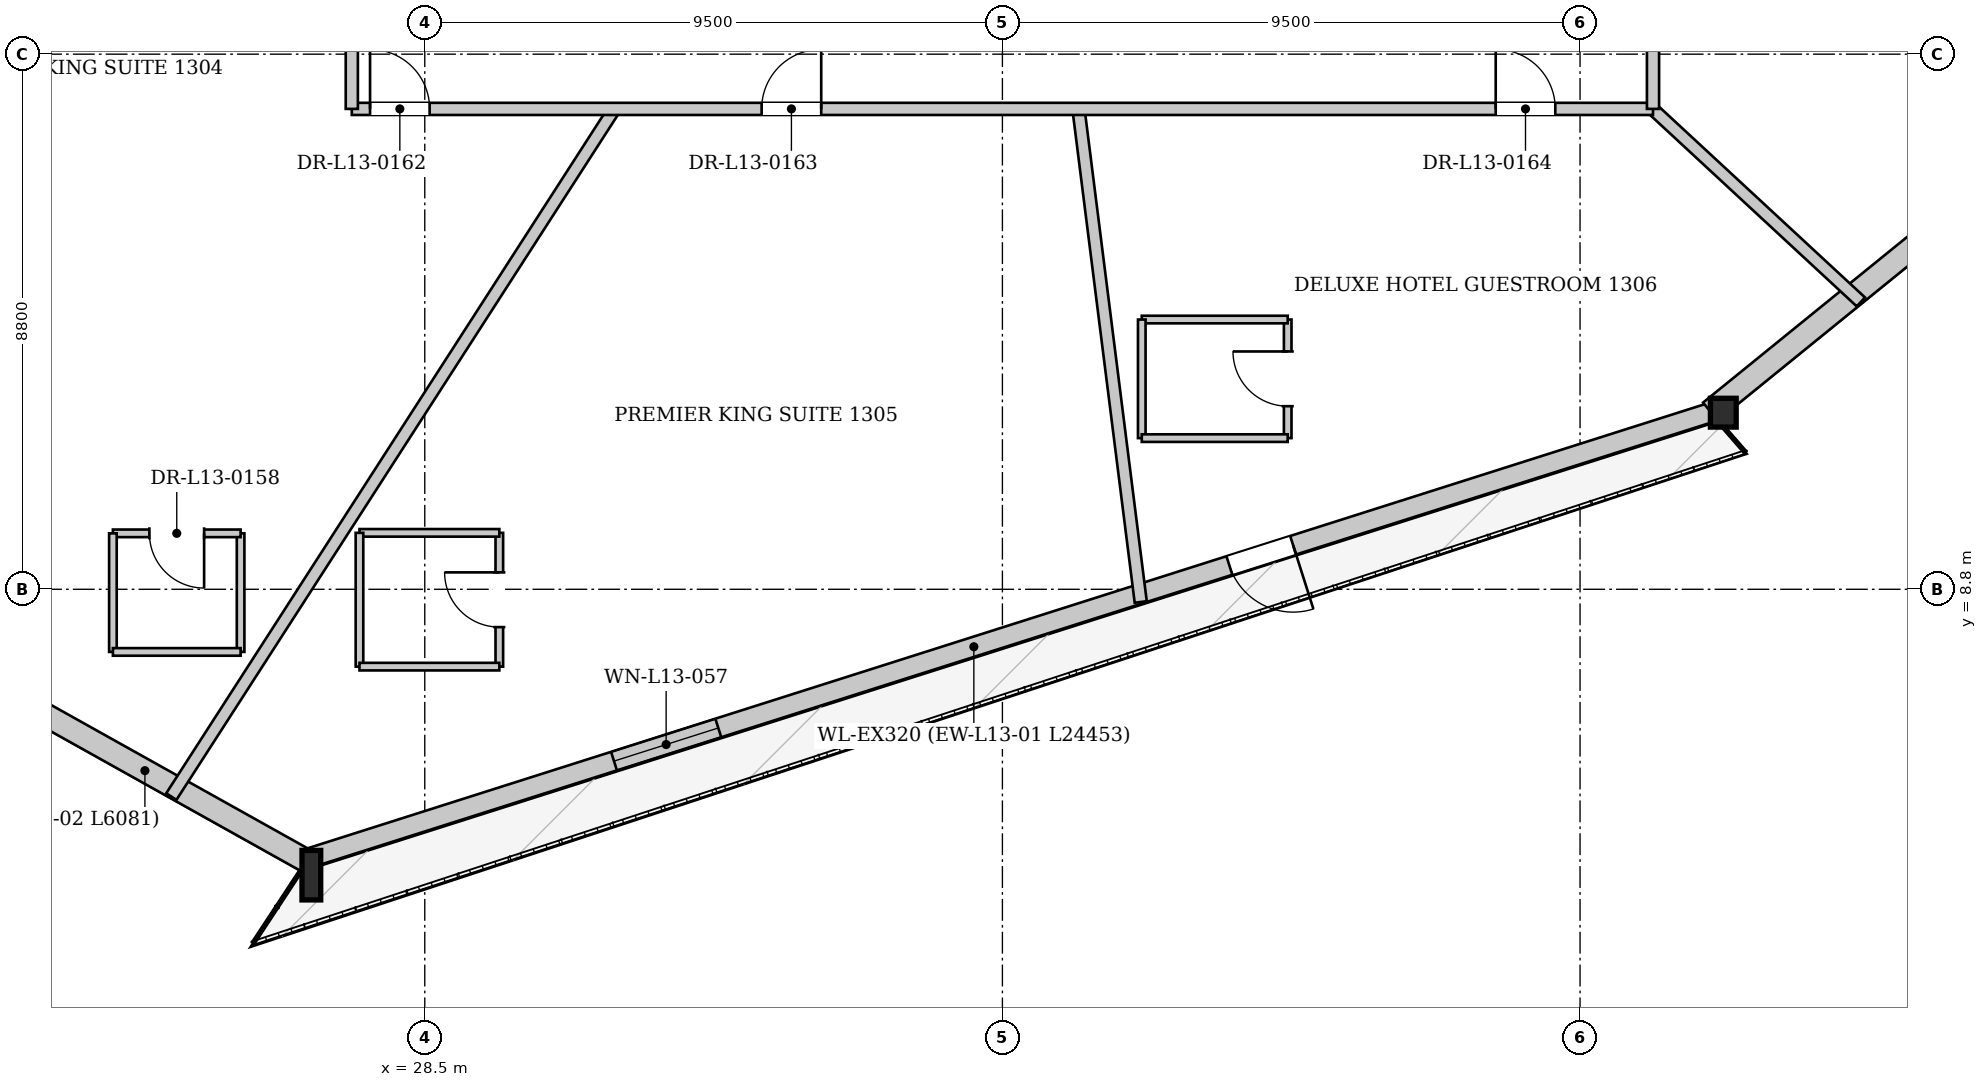
"""IFC4 building model, lengths in metres.
Left out: names, types, materials, properties, quantities, classifications, styles, units other than length and angle.
Written with IfcOpenShell. Run it as: python <this file> out.ifc"""

import sys

from ifc_helpers import new_model, si_unit, direction, frame, frame_2d, origin, origin_2d, place, context, subcontext, project, spatial, rectangle, i_section, extrude, source, transform, mapped, element, fill, save


model = new_model("IFC4")
c1 = context("Model", 3, precision=1e-05, world=origin(), true_north=direction((0.0, 1.0)))
c2 = subcontext(c1, "Body", "Model", "MODEL_VIEW")
j1 = project(units=[si_unit("LENGTHUNIT", "METRE"), si_unit("PLANEANGLEUNIT", "RADIAN")], contexts=[c1])
p1 = place(None, origin())
s1 = spatial("IfcSite", under=j1, at=p1, CompositionType="ELEMENT")
p2 = place(p1, origin())
s2 = spatial("IfcBuilding", under=s1, at=p2, CompositionType="ELEMENT")
p3 = place(p2, frame((0.0, 0.0, 54.15)))
s3 = spatial("IfcBuildingStorey", under=s2, at=p3, CompositionType="ELEMENT", Elevation=54.15)
m1 = source(origin(), c2, "Body", "SweptSolid", [
    extrude(i_section(OverallWidth=0.308, OverallDepth=0.814, WebThickness=0.021, FlangeThickness=0.04, at=origin_2d()), origin(), (0.0, 0.0, 1.0), 3.406),
])
p4 = place(p3, frame((26.459, 4.168, 0.0), z_axis=(0.103287038269, -0.040999435038, 0.993806235668), x_axis=(0.368942816589, 0.929452095639, 0.0)))
e1 = element("IfcColumn", 1, at=p4, inside=s3, PredefinedType="COLUMN", context=c2, shape_type="MappedRepresentation", body=[
    mapped(m1, transform((0.0, 0.0, 0.0), x_axis=(1.0, 0.0, 0.0), y_axis=(0.0, 1.0, 0.0), z_axis=(0.0, 0.0, 1.0), scale=1.0)),
])
m2 = source(origin(), c2, "Body", "SweptSolid", [
    extrude(i_section(OverallWidth=0.424, OverallDepth=0.474, WebThickness=0.043, FlangeThickness=0.068, at=origin_2d()), origin(), (0.0, 0.0, 1.0), 3.4),
])
p5 = place(p3, frame((49.763, 11.575, 0.0), z_axis=(0.054718314764, 0.075686487876, 0.995629178752), x_axis=(-0.810395288449, 0.585883500757, 0.0)))
e2 = element("IfcColumn", 2, at=p5, inside=s3, PredefinedType="COLUMN", context=c2, shape_type="MappedRepresentation", body=[
    mapped(m2, transform((0.0, 0.0, 0.0), x_axis=(1.0, 0.0, 0.0), y_axis=(0.0, 1.0, 0.0), z_axis=(0.0, 0.0, 1.0), scale=1.0)),
])
p6 = place(p3, frame((49.715, 11.728, 0.0), z_axis=(0.0, 0.0, 1.0), x_axis=(-0.95301817626, -0.30291311579, 0.0)))
e3 = element("IfcWall", 3, at=p6, inside=s3, PredefinedType="SOLIDWALL", context=c2, shape_type="SweptSolid", body=[
    extrude(rectangle(XDim=24.453, YDim=0.32, at=frame_2d((12.227, 0.0))), origin(), (0.0, 0.0, 1.0), 2.592),
])
p7 = place(p6, frame((7.275, 0.0, 0.0)))
e4 = element("IfcOpeningElement", 4, at=p7, cuts=e3, PredefinedType="OPENING", context=c2, shape_type="SweptSolid", body=[
    extrude(rectangle(XDim=1.1, YDim=2.3, at=frame_2d((0.55, 1.15))), frame((0.0, 0.17, 0.0), z_axis=(0.0, -1.0, 0.0), x_axis=(1.0, 0.0, 0.0)), (0.0, 0.0, 1.0), 0.34),
])
p8 = place(p6, frame((17.195, 0.0, 0.272)))
e5 = element("IfcOpeningElement", 5, at=p8, cuts=e3, PredefinedType="OPENING", context=c2, shape_type="SweptSolid", body=[
    extrude(rectangle(XDim=1.8, YDim=2.2, at=frame_2d((0.9, 1.1))), frame((0.0, 0.17, 0.0), z_axis=(0.0, -1.0, 0.0), x_axis=(1.0, 0.0, 0.0)), (0.0, 0.0, 1.0), 0.34),
])
p9 = place(p3, frame((26.552, 4.334, 0.0), z_axis=(0.0, 0.0, 1.0), x_axis=(-0.872917836557, 0.487867246923, 0.0)))
e6 = element("IfcWall", 6, at=p9, inside=s3, PredefinedType="SOLIDWALL", context=c2, shape_type="SweptSolid", body=[
    extrude(rectangle(XDim=6.081, YDim=0.38, at=frame_2d((3.041, 0.0))), origin(), (0.0, 0.0, 1.0), 2.592),
])
p10 = place(p3, frame((68.629, 27.134, 0.0), z_axis=(0.0, 0.0, 1.0), x_axis=(-0.7764202155, -0.630215557538, 0.0)))
e7 = element("IfcWall", 7, at=p10, inside=s3, PredefinedType="SOLIDWALL", context=c2, shape_type="SweptSolid", body=[
    extrude(rectangle(XDim=24.453, YDim=0.38, at=frame_2d((12.227, 0.0))), origin(), (0.0, 0.0, 1.0), 2.592),
])
p11 = place(p10, frame((4.147, 0.0, 0.222)))
e8 = element("IfcOpeningElement", 8, at=p11, cuts=e7, PredefinedType="OPENING", context=c2, shape_type="SweptSolid", body=[
    extrude(rectangle(XDim=2.2, YDim=2.25, at=frame_2d((1.1, 1.125))), frame((0.0, 0.2, 0.0), z_axis=(0.0, -1.0, 0.0), x_axis=(1.0, 0.0, 0.0)), (0.0, 0.0, 1.0), 0.4),
])
p12 = place(p10, frame((16.506, 0.0, 0.222)))
e9 = element("IfcOpeningElement", 9, at=p12, cuts=e7, PredefinedType="OPENING", context=c2, shape_type="SweptSolid", body=[
    extrude(rectangle(XDim=2.2, YDim=2.25, at=frame_2d((1.1, 1.125))), frame((0.0, 0.2, 0.0), z_axis=(0.0, -1.0, 0.0), x_axis=(1.0, 0.0, 0.0)), (0.0, 0.0, 1.0), 0.4),
])
p13 = place(p3, frame((31.62, 16.7, 0.0), z_axis=(0.0, 0.0, 1.0), x_axis=(-0.541710166358, -0.840565342888, 0.0)))
e10 = element("IfcWall", 10, at=p13, inside=s3, PredefinedType="PARTITIONING", context=c2, shape_type="SweptSolid", body=[
    extrude(rectangle(XDim=13.454, YDim=0.2, at=frame_2d((6.727, 0.0))), origin(), (0.0, 0.0, 1.0), 3.3),
])
p14 = place(p3, frame((39.251, 16.7, 0.0), z_axis=(0.0, 0.0, 1.0), x_axis=(0.125310369071, -0.992117589504, 0.0)))
e11 = element("IfcWall", 11, at=p14, inside=s3, PredefinedType="PARTITIONING", context=c2, shape_type="SweptSolid", body=[
    extrude(rectangle(XDim=8.173, YDim=0.2, at=frame_2d((4.086, 0.0))), origin(), (0.0, 0.0, 1.0), 3.3),
])
p15 = place(p3, frame((48.691, 16.7, 0.0), z_axis=(0.0, 0.0, 1.0), x_axis=(0.733736548666, -0.679434085951, 0.0)))
e12 = element("IfcWall", 12, at=p15, inside=s3, PredefinedType="PARTITIONING", context=c2, shape_type="SweptSolid", body=[
    extrude(rectangle(XDim=4.671, YDim=0.2, at=frame_2d((2.336, 0.0))), origin(), (0.0, 0.0, 1.0), 3.3),
])
p16 = place(p3, frame((25.471, 7.77, 0.0), z_axis=(0.0, 0.0, 1.0), x_axis=(0.0, 1.0, 0.0)))
e13 = element("IfcWall", 13, at=p16, inside=s3, PredefinedType="PARTITIONING", context=c2, shape_type="SweptSolid", body=[
    extrude(rectangle(XDim=1.95, YDim=0.125, at=frame_2d((0.975, 0.0))), origin(), (0.0, 0.0, 1.0), 3.3),
])
p17 = place(p3, frame((25.471, 9.72, 0.0), z_axis=(0.0, 0.0, 1.0), x_axis=(-1.0, 0.0, 0.0)))
e14 = element("IfcWall", 14, at=p17, inside=s3, PredefinedType="PARTITIONING", context=c2, shape_type="SweptSolid", body=[
    extrude(rectangle(XDim=2.1, YDim=0.125, at=frame_2d((1.05, 0.0))), origin(), (0.0, 0.0, 1.0), 3.3),
])
p18 = place(p17, frame((0.6, 0.0, 0.0)))
e15 = element("IfcOpeningElement", 15, at=p18, cuts=e14, PredefinedType="OPENING", context=c2, shape_type="SweptSolid", body=[
    extrude(rectangle(XDim=0.9, YDim=2.1, at=frame_2d((0.45, 1.05))), frame((0.0, 0.073, 0.0), z_axis=(0.0, -1.0, 0.0), x_axis=(1.0, 0.0, 0.0)), (0.0, 0.0, 1.0), 0.145),
])
p19 = place(p3, frame((23.371, 9.72, 0.0), z_axis=(0.0, 0.0, 1.0), x_axis=(0.0, -1.0, 0.0)))
e16 = element("IfcWall", 16, at=p19, inside=s3, PredefinedType="PARTITIONING", context=c2, shape_type="SweptSolid", body=[
    extrude(rectangle(XDim=1.95, YDim=0.125, at=frame_2d((0.975, 0.0))), origin(), (0.0, 0.0, 1.0), 3.3),
])
p20 = place(p3, frame((23.371, 7.77, 0.0), z_axis=(0.0, 0.0, 1.0), x_axis=(1.0, 0.0, 0.0)))
e17 = element("IfcWall", 17, at=p20, inside=s3, PredefinedType="PARTITIONING", context=c2, shape_type="SweptSolid", body=[
    extrude(rectangle(XDim=2.1, YDim=0.125, at=frame_2d((1.05, 0.0))), origin(), (0.0, 0.0, 1.0), 3.3),
])
p21 = place(p3, frame((29.726, 7.528, 0.0), z_axis=(0.0, 0.0, 1.0), x_axis=(0.0, 1.0, 0.0)))
e18 = element("IfcWall", 18, at=p21, inside=s3, PredefinedType="PARTITIONING", context=c2, shape_type="SweptSolid", body=[
    extrude(rectangle(XDim=2.2, YDim=0.125, at=frame_2d((1.1, 0.0))), origin(), (0.0, 0.0, 1.0), 2.795),
])
p22 = place(p21, frame((0.65, 0.0, 0.0)))
e19 = element("IfcOpeningElement", 19, at=p22, cuts=e18, PredefinedType="OPENING", context=c2, shape_type="SweptSolid", body=[
    extrude(rectangle(XDim=0.9, YDim=2.1, at=frame_2d((0.45, 1.05))), frame((0.0, 0.073, 0.0), z_axis=(0.0, -1.0, 0.0), x_axis=(1.0, 0.0, 0.0)), (0.0, 0.0, 1.0), 0.145),
])
p23 = place(p3, frame((29.726, 9.728, 0.0), z_axis=(0.0, 0.0, 1.0), x_axis=(-1.0, 0.0, 0.0)))
e20 = element("IfcWall", 20, at=p23, inside=s3, PredefinedType="PARTITIONING", context=c2, shape_type="SweptSolid", body=[
    extrude(rectangle(XDim=2.3, YDim=0.125, at=frame_2d((1.15, 0.0))), origin(), (0.0, 0.0, 1.0), 3.3),
])
p24 = place(p3, frame((27.426, 9.728, 0.0), z_axis=(0.0, 0.0, 1.0), x_axis=(0.0, -1.0, 0.0)))
e21 = element("IfcWall", 21, at=p24, inside=s3, PredefinedType="PARTITIONING", context=c2, shape_type="SweptSolid", body=[
    extrude(rectangle(XDim=2.2, YDim=0.125, at=frame_2d((1.1, 0.0))), origin(), (0.0, 0.0, 1.0), 3.3),
])
p25 = place(p3, frame((27.426, 7.528, 0.0), z_axis=(0.0, 0.0, 1.0), x_axis=(1.0, 0.0, 0.0)))
e22 = element("IfcWall", 22, at=p25, inside=s3, PredefinedType="PARTITIONING", context=c2, shape_type="SweptSolid", body=[
    extrude(rectangle(XDim=2.3, YDim=0.125, at=frame_2d((1.15, 0.0))), origin(), (0.0, 0.0, 1.0), 3.3),
])
p26 = place(p3, frame((42.692, 11.286, 0.0), z_axis=(0.0, 0.0, 1.0), x_axis=(0.0, 1.0, 0.0)))
e23 = element("IfcWall", 23, at=p26, inside=s3, PredefinedType="PARTITIONING", context=c2, shape_type="SweptSolid", body=[
    extrude(rectangle(XDim=1.95, YDim=0.125, at=frame_2d((0.975, 0.0))), origin(), (0.0, 0.0, 1.0), 3.3),
])
p27 = place(p26, frame((0.525, 0.0, 0.0)))
e24 = element("IfcOpeningElement", 24, at=p27, cuts=e23, PredefinedType="OPENING", context=c2, shape_type="SweptSolid", body=[
    extrude(rectangle(XDim=0.9, YDim=2.1, at=frame_2d((0.45, 1.05))), frame((0.0, 0.073, 0.0), z_axis=(0.0, -1.0, 0.0), x_axis=(1.0, 0.0, 0.0)), (0.0, 0.0, 1.0), 0.145),
])
p28 = place(p3, frame((42.692, 13.236, 0.0), z_axis=(0.0, 0.0, 1.0), x_axis=(-1.0, 0.0, 0.0)))
e25 = element("IfcWall", 25, at=p28, inside=s3, PredefinedType="PARTITIONING", context=c2, shape_type="SweptSolid", body=[
    extrude(rectangle(XDim=2.4, YDim=0.125, at=frame_2d((1.2, 0.0))), origin(), (0.0, 0.0, 1.0), 2.925),
])
p29 = place(p3, frame((40.292, 13.236, 0.0), z_axis=(0.0, 0.0, 1.0), x_axis=(0.0, -1.0, 0.0)))
e26 = element("IfcWall", 26, at=p29, inside=s3, PredefinedType="PARTITIONING", context=c2, shape_type="SweptSolid", body=[
    extrude(rectangle(XDim=1.95, YDim=0.125, at=frame_2d((0.975, 0.0))), origin(), (0.0, 0.0, 1.0), 3.3),
])
p30 = place(p3, frame((40.292, 11.286, 0.0), z_axis=(0.0, 0.0, 1.0), x_axis=(1.0, 0.0, 0.0)))
e27 = element("IfcWall", 27, at=p30, inside=s3, PredefinedType="PARTITIONING", context=c2, shape_type="SweptSolid", body=[
    extrude(rectangle(XDim=2.4, YDim=0.125, at=frame_2d((1.2, 0.0))), origin(), (0.0, 0.0, 1.0), 3.3),
])
p31 = place(p3, frame((27.3, 16.7, 0.0), z_axis=(0.0, 0.0, 1.0), x_axis=(1.0, 0.0, 0.0)))
e28 = element("IfcWall", 28, at=p31, inside=s3, PredefinedType="PARTITIONING", context=c2, shape_type="SweptSolid", body=[
    extrude(rectangle(XDim=21.4, YDim=0.2, at=frame_2d((10.7, 0.0))), origin(), (0.0, 0.0, 1.0), 3.3),
])
p32 = place(p31, frame((0.3, 0.0, 0.0)))
e29 = element("IfcOpeningElement", 29, at=p32, cuts=e28, PredefinedType="OPENING", context=c2, shape_type="SweptSolid", body=[
    extrude(rectangle(XDim=0.98, YDim=2.15, at=frame_2d((0.49, 1.075))), frame((0.0, 0.11, 0.0), z_axis=(0.0, -1.0, 0.0), x_axis=(1.0, 0.0, 0.0)), (0.0, 0.0, 1.0), 0.22),
])
p33 = place(p31, frame((6.74, 0.0, 0.0)))
e30 = element("IfcOpeningElement", 30, at=p33, cuts=e28, PredefinedType="OPENING", context=c2, shape_type="SweptSolid", body=[
    extrude(rectangle(XDim=0.98, YDim=2.15, at=frame_2d((0.49, 1.075))), frame((0.0, 0.11, 0.0), z_axis=(0.0, -1.0, 0.0), x_axis=(1.0, 0.0, 0.0)), (0.0, 0.0, 1.0), 0.22),
])
p34 = place(p31, frame((18.813, 0.0, 0.0)))
e31 = element("IfcOpeningElement", 31, at=p34, cuts=e28, PredefinedType="OPENING", context=c2, shape_type="SweptSolid", body=[
    extrude(rectangle(XDim=0.98, YDim=2.15, at=frame_2d((0.49, 1.075))), frame((0.0, 0.11, 0.0), z_axis=(0.0, -1.0, 0.0), x_axis=(1.0, 0.0, 0.0)), (0.0, 0.0, 1.0), 0.22),
])
p35 = place(p3, frame((27.3, 16.7, 0.0), z_axis=(0.0, 0.0, 1.0), x_axis=(0.0, 1.0, 0.0)))
e32 = element("IfcWall", 32, at=p35, inside=s3, PredefinedType="PARTITIONING", context=c2, shape_type="SweptSolid", body=[
    extrude(rectangle(XDim=19.8, YDim=0.2, at=frame_2d((9.9, 0.0))), origin(), (0.0, 0.0, 1.0), 3.3),
])
p36 = place(p35, frame((18.52, 0.0, 0.0)))
e33 = element("IfcOpeningElement", 33, at=p36, cuts=e32, PredefinedType="OPENING", context=c2, shape_type="SweptSolid", body=[
    extrude(rectangle(XDim=0.98, YDim=2.15, at=frame_2d((0.49, 1.075))), frame((0.0, 0.11, 0.0), z_axis=(0.0, -1.0, 0.0), x_axis=(1.0, 0.0, 0.0)), (0.0, 0.0, 1.0), 0.22),
])
p37 = place(p35, frame((10.654, 0.0, 0.0)))
e34 = element("IfcOpeningElement", 34, at=p37, cuts=e32, PredefinedType="OPENING", context=c2, shape_type="SweptSolid", body=[
    extrude(rectangle(XDim=0.98, YDim=2.15, at=frame_2d((0.49, 1.075))), frame((0.0, 0.11, 0.0), z_axis=(0.0, -1.0, 0.0), x_axis=(1.0, 0.0, 0.0)), (0.0, 0.0, 1.0), 0.22),
])
p38 = place(p3, frame((48.7, 16.7, 0.0), z_axis=(0.0, 0.0, 1.0), x_axis=(0.0, 1.0, 0.0)))
e35 = element("IfcWall", 35, at=p38, inside=s3, PredefinedType="PARTITIONING", context=c2, shape_type="SweptSolid", body=[
    extrude(rectangle(XDim=19.8, YDim=0.2, at=frame_2d((9.9, 0.0))), origin(), (0.0, 0.0, 1.0), 3.3),
])
p39 = place(p38, frame((1.342, 0.0, 0.0)))
e36 = element("IfcOpeningElement", 36, at=p39, cuts=e35, PredefinedType="OPENING", context=c2, shape_type="SweptSolid", body=[
    extrude(rectangle(XDim=0.98, YDim=2.15, at=frame_2d((0.49, 1.075))), frame((0.0, 0.11, 0.0), z_axis=(0.0, -1.0, 0.0), x_axis=(1.0, 0.0, 0.0)), (0.0, 0.0, 1.0), 0.22),
])
m3 = source(origin(), c2, "Body", "SweptSolid", [
    extrude(rectangle(XDim=1.1, YDim=2.3, at=frame_2d((0.55, 1.15))), frame((0.0, 0.025, 0.0), z_axis=(0.0, -1.0, 0.0), x_axis=(1.0, 0.0, 0.0)), (0.0, 0.0, 1.0), 0.05),
])
p40 = place(p7, origin())
e37 = element("IfcDoor", 37, at=p40, inside=s3, OperationType="SINGLE_SWING_LEFT", PredefinedType="DOOR", context=c2, shape_type="MappedRepresentation", body=[
    mapped(m3, transform((0.0, 0.0, 0.0), x_axis=(1.0, 0.0, 0.0), y_axis=(0.0, 1.0, 0.0), z_axis=(0.0, 0.0, 1.0), scale=1.0)),
])
fill(e4, e37)
m4 = source(origin(), c2, "Body", "SweptSolid", [
    extrude(rectangle(XDim=1.8, YDim=2.2, at=frame_2d((0.9, 1.1))), frame((0.0, 0.03, 0.0), z_axis=(0.0, -1.0, 0.0), x_axis=(1.0, 0.0, 0.0)), (0.0, 0.0, 1.0), 0.06),
])
p41 = place(p8, origin())
e38 = element("IfcWindow", 38, at=p41, inside=s3, PartitioningType="SINGLE_PANEL", PredefinedType="WINDOW", context=c2, shape_type="MappedRepresentation", body=[
    mapped(m4, transform((0.0, 0.0, 0.0), x_axis=(1.0, 0.0, 0.0), y_axis=(0.0, 1.0, 0.0), z_axis=(0.0, 0.0, 1.0), scale=1.0)),
])
fill(e5, e38)
m5 = source(origin(), c2, "Body", "SweptSolid", [
    extrude(rectangle(XDim=0.9, YDim=2.1, at=frame_2d((0.45, 1.05))), frame((0.0, 0.025, 0.0), z_axis=(0.0, -1.0, 0.0), x_axis=(1.0, 0.0, 0.0)), (0.0, 0.0, 1.0), 0.05),
])
p42 = place(p18, origin())
e39 = element("IfcDoor", 39, at=p42, inside=s3, OperationType="SINGLE_SWING_LEFT", PredefinedType="DOOR", context=c2, shape_type="MappedRepresentation", body=[
    mapped(m5, transform((0.0, 0.0, 0.0), x_axis=(1.0, 0.0, 0.0), y_axis=(0.0, 1.0, 0.0), z_axis=(0.0, 0.0, 1.0), scale=1.0)),
])
fill(e15, e39)
p43 = place(p22, origin())
e40 = element("IfcDoor", 40, at=p43, inside=s3, OperationType="SINGLE_SWING_RIGHT", PredefinedType="DOOR", context=c2, shape_type="MappedRepresentation", body=[
    mapped(m5, transform((0.0, 0.0, 0.0), x_axis=(1.0, 0.0, 0.0), y_axis=(0.0, 1.0, 0.0), z_axis=(0.0, 0.0, 1.0), scale=1.0)),
])
fill(e19, e40)
p44 = place(p27, origin())
e41 = element("IfcDoor", 41, at=p44, inside=s3, OperationType="SINGLE_SWING_RIGHT", PredefinedType="DOOR", context=c2, shape_type="MappedRepresentation", body=[
    mapped(m5, transform((0.0, 0.0, 0.0), x_axis=(1.0, 0.0, 0.0), y_axis=(0.0, 1.0, 0.0), z_axis=(0.0, 0.0, 1.0), scale=1.0)),
])
fill(e24, e41)
m6 = source(origin(), c2, "Body", "SweptSolid", [
    extrude(rectangle(XDim=0.98, YDim=2.15, at=frame_2d((0.49, 1.075))), frame((0.0, 0.025, 0.0), z_axis=(0.0, -1.0, 0.0), x_axis=(1.0, 0.0, 0.0)), (0.0, 0.0, 1.0), 0.05),
])
p45 = place(p32, origin())
e42 = element("IfcDoor", 42, at=p45, inside=s3, OperationType="SINGLE_SWING_LEFT", PredefinedType="DOOR", context=c2, shape_type="MappedRepresentation", body=[
    mapped(m6, transform((0.0, 0.0, 0.0), x_axis=(1.0, 0.0, 0.0), y_axis=(0.0, 1.0, 0.0), z_axis=(0.0, 0.0, 1.0), scale=1.0)),
])
fill(e29, e42)
p46 = place(p33, origin())
e43 = element("IfcDoor", 43, at=p46, inside=s3, OperationType="SINGLE_SWING_RIGHT", PredefinedType="DOOR", context=c2, shape_type="MappedRepresentation", body=[
    mapped(m6, transform((0.0, 0.0, 0.0), x_axis=(1.0, 0.0, 0.0), y_axis=(0.0, 1.0, 0.0), z_axis=(0.0, 0.0, 1.0), scale=1.0)),
])
fill(e30, e43)
p47 = place(p34, origin())
e44 = element("IfcDoor", 44, at=p47, inside=s3, OperationType="SINGLE_SWING_LEFT", PredefinedType="DOOR", context=c2, shape_type="MappedRepresentation", body=[
    mapped(m6, transform((0.0, 0.0, 0.0), x_axis=(1.0, 0.0, 0.0), y_axis=(0.0, 1.0, 0.0), z_axis=(0.0, 0.0, 1.0), scale=1.0)),
])
fill(e31, e44)
save(model, sys.argv[1])
